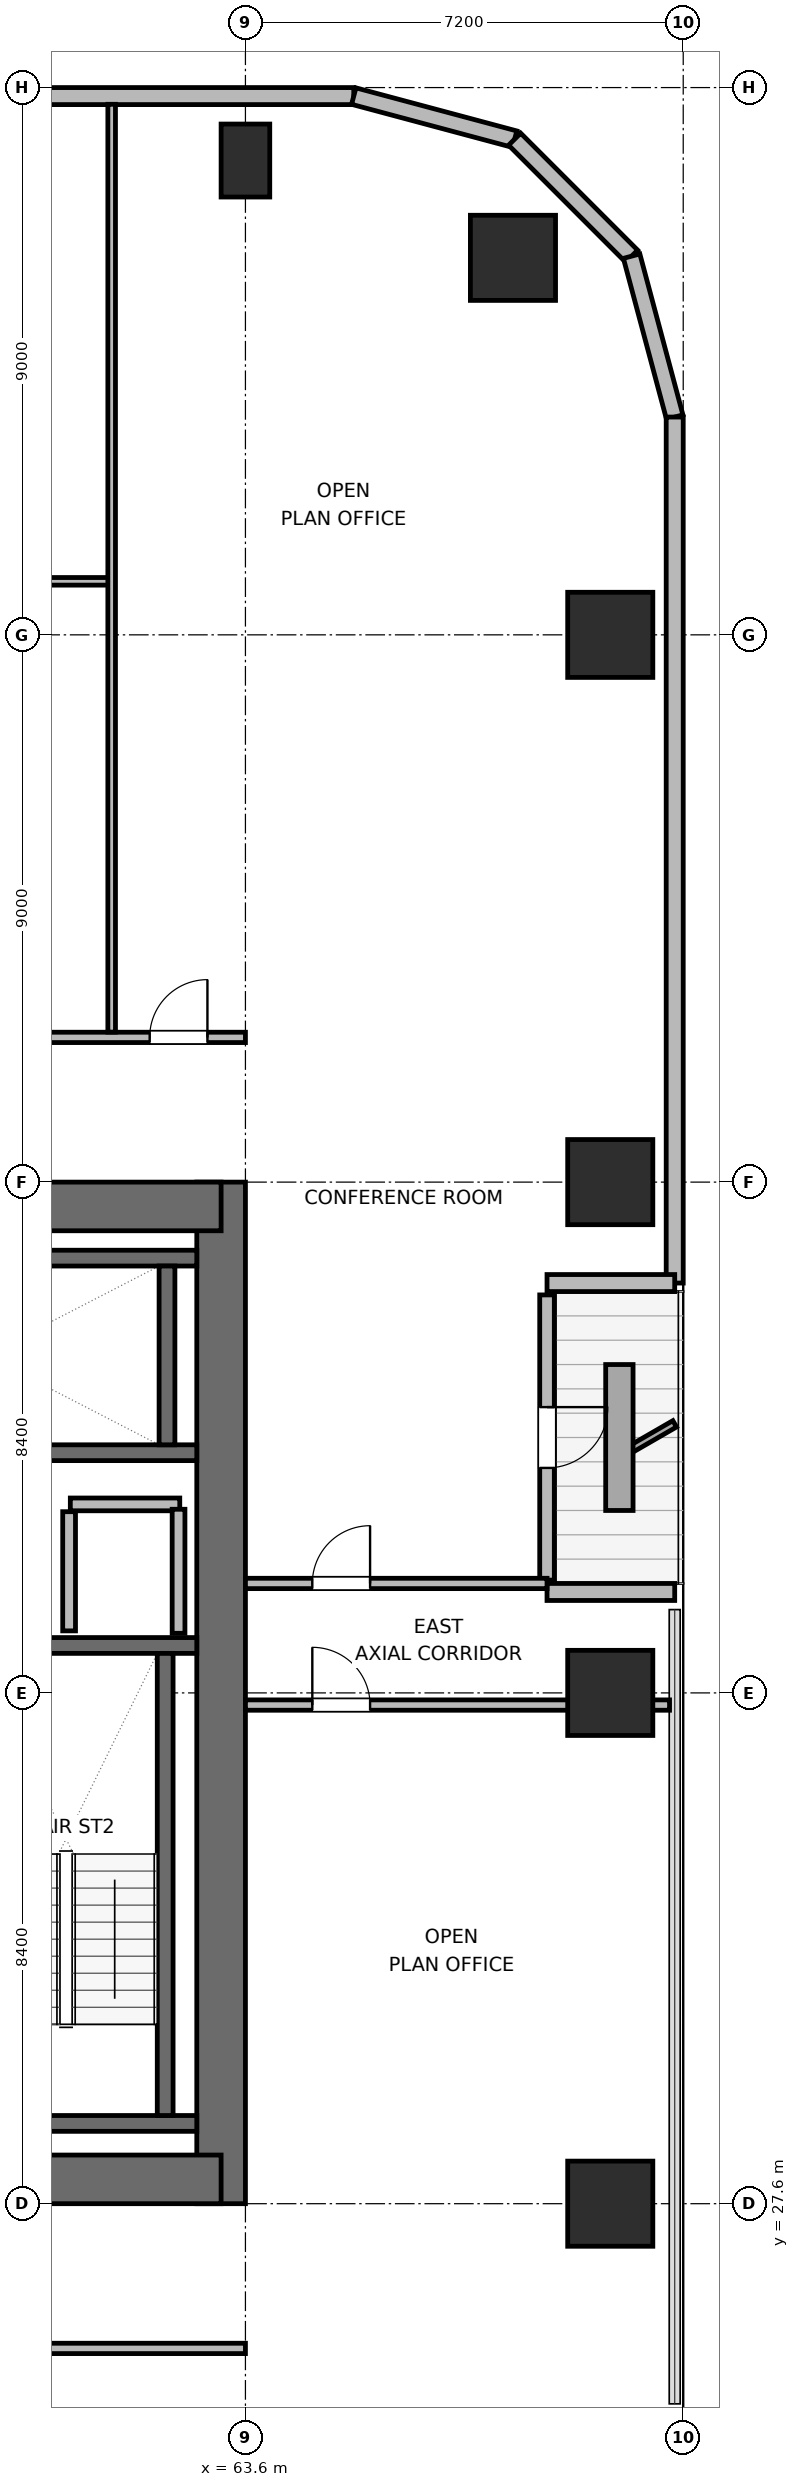
"""IFC4 building model, lengths in metres.
Left out: names, types, materials, properties, quantities, classifications, styles, units other than length and angle.
Written with IfcOpenShell. Run it as: python <this file> out.ifc"""

import sys

from ifc_helpers import new_model, si_unit, direction, frame, frame_2d, origin, origin_2d, place, context, subcontext, project, spatial, rectangle, circle, extrude, element, fill, save


model = new_model("IFC4")
c1 = context("Model", 3, precision=1e-05, world=origin(), true_north=direction((0.0, 1.0)))
c2 = subcontext(c1, "Body", "Model", "MODEL_VIEW")
j1 = project(units=[si_unit("LENGTHUNIT", "METRE"), si_unit("PLANEANGLEUNIT", "RADIAN")], contexts=[c1])
p1 = place(None, origin())
s1 = spatial("IfcSite", under=j1, at=p1, CompositionType="ELEMENT")
p2 = place(p1, origin())
s2 = spatial("IfcBuilding", under=s1, at=p2, CompositionType="ELEMENT")
p3 = place(p2, frame((0.0, 0.0, 158.4)))
s3 = spatial("IfcBuildingStorey", under=s2, at=p3, CompositionType="ELEMENT", Elevation=158.4)
p4 = place(p3, frame((63.2, 27.6, 0.0), z_axis=(0.0, 0.0, 1.0), x_axis=(0.0, 1.0, 0.0)))
e1 = element("IfcWall", 1, at=p4, inside=s3, PredefinedType="SHEAR", context=c2, shape_type="SweptSolid", body=[
    extrude(rectangle(XDim=16.8, YDim=0.8, at=frame_2d((8.4, 0.0))), origin(), (0.0, 0.0, 1.0), 3.9),
])
p5 = place(p3, frame((54.0, 28.0, 0.0), z_axis=(0.0, 0.0, 1.0), x_axis=(1.0, 0.0, 0.0)))
e2 = element("IfcWall", 2, at=p5, inside=s3, PredefinedType="SHEAR", context=c2, shape_type="SweptSolid", body=[
    extrude(rectangle(XDim=9.2, YDim=0.8, at=frame_2d((4.6, 0.0))), origin(), (0.0, 0.0, 1.0), 3.9),
])
p6 = place(p5, frame((3.975, 0.0, 0.0)))
e3 = element("IfcOpeningElement", 3, at=p6, cuts=e2, PredefinedType="OPENING", context=c2, shape_type="SweptSolid", body=[
    extrude(rectangle(XDim=1.05, YDim=2.04, at=frame_2d((0.525, 1.02))), frame((0.0, 0.41, 0.0), z_axis=(0.0, -1.0, 0.0), x_axis=(1.0, 0.0, 0.0)), (0.0, 0.0, 1.0), 0.82),
])
p7 = place(p3, frame((54.0, 44.0, 0.0), z_axis=(0.0, 0.0, 1.0), x_axis=(1.0, 0.0, 0.0)))
e4 = element("IfcWall", 4, at=p7, inside=s3, PredefinedType="SHEAR", context=c2, shape_type="SweptSolid", body=[
    extrude(rectangle(XDim=9.2, YDim=0.8, at=frame_2d((4.6, 0.0))), origin(), (0.0, 0.0, 1.0), 3.9),
])
for number, where, z_axis, x_axis in (
    (5, (58.89, 28.92, 0.0), (0.0, 0.0, 1.0), (1.0, 0.0, 0.0)),
    (6, (58.89, 36.78, 0.0), (0.0, 0.0, 1.0), (1.0, 0.0, 0.0)),
):
    element("IfcWall", number, at=place(p3, frame(where, z_axis=z_axis, x_axis=x_axis)), inside=s3, PredefinedType="SHEAR", context=c2, shape_type="SweptSolid", body=[
        extrude(rectangle(XDim=3.91, YDim=0.26, at=frame_2d((1.955, 0.0))), origin(), (0.0, 0.0, 1.0), 3.9),
    ])
p8 = place(p3, frame((62.28, 29.05, 0.0), z_axis=(0.0, 0.0, 1.0), x_axis=(0.0, 1.0, 0.0)))
e7 = element("IfcWall", 7, at=p8, inside=s3, PredefinedType="SHEAR", context=c2, shape_type="SweptSolid", body=[
    extrude(rectangle(XDim=7.6, YDim=0.26, at=frame_2d((3.8, 0.0))), origin(), (0.0, 0.0, 1.0), 3.9),
])
p9 = place(p3, frame((54.4, 39.95, 0.0), z_axis=(0.0, 0.0, 1.0), x_axis=(1.0, 0.0, 0.0)))
e8 = element("IfcWall", 8, at=p9, inside=s3, PredefinedType="SHEAR", context=c2, shape_type="SweptSolid", body=[
    extrude(rectangle(XDim=8.4, YDim=0.26, at=frame_2d((4.2, 0.0))), origin(), (0.0, 0.0, 1.0), 3.9),
])
p10 = place(p9, frame((0.8, 0.0, 0.0)))
e9 = element("IfcOpeningElement", 9, at=p10, cuts=e8, PredefinedType="OPENING", context=c2, shape_type="SweptSolid", body=[
    extrude(rectangle(XDim=1.0, YDim=2.04, at=frame_2d((0.5, 1.02))), frame((0.0, 0.14, 0.0), z_axis=(0.0, -1.0, 0.0), x_axis=(1.0, 0.0, 0.0)), (0.0, 0.0, 1.0), 0.28),
])
p11 = place(p3, frame((54.4, 43.15, 0.0), z_axis=(0.0, 0.0, 1.0), x_axis=(1.0, 0.0, 0.0)))
e10 = element("IfcWall", 10, at=p11, inside=s3, PredefinedType="SHEAR", context=c2, shape_type="SweptSolid", body=[
    extrude(rectangle(XDim=8.4, YDim=0.26, at=frame_2d((4.2, 0.0))), origin(), (0.0, 0.0, 1.0), 3.9),
])
p12 = place(p3, frame((62.31, 40.08, 0.0), z_axis=(0.0, 0.0, 1.0), x_axis=(0.0, 1.0, 0.0)))
e11 = element("IfcWall", 11, at=p12, inside=s3, PredefinedType="SHEAR", context=c2, shape_type="SweptSolid", body=[
    extrude(rectangle(XDim=2.94, YDim=0.26, at=frame_2d((1.47, 0.0))), origin(), (0.0, 0.0, 1.0), 3.9),
])
p13 = place(p3, frame((68.0, 59.6, 0.0), z_axis=(0.0, 0.0, 1.0), x_axis=(1.0, 0.0, 0.0)))
e12 = element("IfcColumn", 12, at=p13, inside=s3, PredefinedType="COLUMN", context=c2, shape_type="SweptSolid", body=[
    extrude(circle(Radius=0.7, at=origin_2d()), origin(), (0.0, 0.0, 1.0), 3.9),
])
p14 = place(p3, frame((63.6, 61.2, 0.0), z_axis=(0.0, 0.0, 1.0), x_axis=(1.0, 0.0, 0.0)))
e13 = element("IfcColumn", 13, at=p14, inside=s3, PredefinedType="COLUMN", context=c2, shape_type="SweptSolid", body=[
    extrude(rectangle(XDim=0.8, YDim=1.2, at=origin_2d()), origin(), (0.0, 0.0, 1.0), 3.9),
])
for number, where, z_axis, x_axis in (
    (14, (69.6, 27.6, 0.0), (0.0, 0.0, 1.0), (1.0, 0.0, 0.0)),
    (15, (69.6, 36.0, 0.0), (0.0, 0.0, 1.0), (1.0, 0.0, 0.0)),
    (16, (69.6, 44.4, 0.0), (0.0, 0.0, 1.0), (1.0, 0.0, 0.0)),
    (17, (69.6, 53.4, 0.0), (0.0, 0.0, 1.0), (1.0, 0.0, 0.0)),
):
    element("IfcColumn", number, at=place(p3, frame(where, z_axis=z_axis, x_axis=x_axis)), inside=s3, PredefinedType="COLUMN", context=c2, shape_type="SweptSolid", body=[
        extrude(rectangle(XDim=1.4, YDim=1.4, at=origin_2d()), origin(), (0.0, 0.0, 1.0), 3.9),
    ])
p15 = place(p3, frame((54.64, 62.26, 0.0), z_axis=(0.0, 0.0, 1.0), x_axis=(1.0, 0.0, 0.0)))
e18 = element("IfcWall", 18, at=p15, inside=s3, PredefinedType="SOLIDWALL", context=c2, shape_type="SweptSolid", body=[
    extrude(rectangle(XDim=10.742, YDim=0.28, at=frame_2d((5.371, 0.0))), origin(), (0.0, 0.0, 1.0), 3.68),
])
p16 = place(p3, frame((65.382, 62.26, 0.0), z_axis=(0.0, 0.0, 1.0), x_axis=(0.965971118627, -0.258649952598, 0.0)))
e19 = element("IfcWall", 19, at=p16, inside=s3, PredefinedType="SOLIDWALL", context=c2, shape_type="SweptSolid", body=[
    extrude(rectangle(XDim=2.739, YDim=0.28, at=frame_2d((1.37, 0.0))), origin(), (0.0, 0.0, 1.0), 3.68),
])
p17 = place(p3, frame((68.028, 61.552, 0.0), z_axis=(0.0, 0.0, 1.0), x_axis=(0.707061915429, -0.707151644098, 0.0)))
e20 = element("IfcWall", 20, at=p17, inside=s3, PredefinedType="SOLIDWALL", context=c2, shape_type="SweptSolid", body=[
    extrude(rectangle(XDim=2.721, YDim=0.28, at=frame_2d((1.36, 0.0))), origin(), (0.0, 0.0, 1.0), 3.68),
])
p18 = place(p3, frame((69.951, 59.627, 0.0), z_axis=(0.0, 0.0, 1.0), x_axis=(0.258672222976, -0.9659651552, 0.0)))
e21 = element("IfcWall", 21, at=p18, inside=s3, PredefinedType="SOLIDWALL", context=c2, shape_type="SweptSolid", body=[
    extrude(rectangle(XDim=2.739, YDim=0.28, at=frame_2d((1.37, 0.0))), origin(), (0.0, 0.0, 1.0), 3.68),
])
p19 = place(p3, frame((70.66, 56.982, 0.0), z_axis=(0.0, 0.0, 1.0), x_axis=(0.0, -1.0, 0.0)))
e22 = element("IfcWall", 22, at=p19, inside=s3, PredefinedType="SOLIDWALL", context=c2, shape_type="SweptSolid", body=[
    extrude(rectangle(XDim=14.242, YDim=0.28, at=frame_2d((7.121, 0.0))), origin(), (0.0, 0.0, 1.0), 3.68),
])
p20 = place(p3, frame((70.66, 42.74, 0.0), z_axis=(0.0, 0.0, 1.0), x_axis=(-1.0, 0.0, 0.0)))
e23 = element("IfcWall", 23, at=p20, inside=s3, PredefinedType="SOLIDWALL", context=c2, shape_type="SweptSolid", body=[
    extrude(rectangle(XDim=2.1, YDim=0.28, at=frame_2d((1.05, 0.0))), origin(), (0.0, 0.0, 1.0), 3.116),
])
p21 = place(p3, frame((68.56, 42.545, 0.0), z_axis=(0.0, 0.0, 1.0), x_axis=(0.0, -1.0, 0.0)))
e24 = element("IfcWall", 24, at=p21, inside=s3, PredefinedType="SOLIDWALL", context=c2, shape_type="SweptSolid", body=[
    extrude(rectangle(XDim=4.69, YDim=0.24, at=frame_2d((2.345, 0.0))), origin(), (0.0, 0.0, 1.0), 3.248),
])
p22 = place(p21, frame((1.845, 0.0, 0.0)))
e25 = element("IfcOpeningElement", 25, at=p22, cuts=e24, PredefinedType="OPENING", context=c2, shape_type="SweptSolid", body=[
    extrude(rectangle(XDim=1.0, YDim=2.02, at=frame_2d((0.5, 1.01))), frame((0.0, 0.13, 0.0), z_axis=(0.0, -1.0, 0.0), x_axis=(1.0, 0.0, 0.0)), (0.0, 0.0, 1.0), 0.26),
])
p23 = place(p3, frame((68.56, 37.66, 0.0), z_axis=(0.0, 0.0, 1.0), x_axis=(1.0, 0.0, 0.0)))
e26 = element("IfcWall", 26, at=p23, inside=s3, PredefinedType="SOLIDWALL", context=c2, shape_type="SweptSolid", body=[
    extrude(rectangle(XDim=2.1, YDim=0.28, at=frame_2d((1.05, 0.0))), origin(), (0.0, 0.0, 1.0), 3.116),
])
p24 = place(p3, frame((60.72, 39.1, 0.0), z_axis=(0.0, 0.0, 1.0), x_axis=(1.0, 0.0, 0.0)))
e27 = element("IfcWall", 27, at=p24, inside=s3, PredefinedType="PARTITIONING", context=c2, shape_type="SweptSolid", body=[
    extrude(rectangle(XDim=1.8, YDim=0.21, at=frame_2d((0.9, 0.0))), origin(), (0.0, 0.0, 1.0), 3.68),
])
p25 = place(p3, frame((60.7, 37.02, 0.0), z_axis=(0.0, 0.0, 1.0), x_axis=(0.0, 1.0, 0.0)))
e28 = element("IfcWall", 28, at=p25, inside=s3, PredefinedType="PARTITIONING", context=c2, shape_type="SweptSolid", body=[
    extrude(rectangle(XDim=1.96, YDim=0.21, at=frame_2d((0.98, 0.0))), origin(), (0.0, 0.0, 1.0), 3.68),
])
p26 = place(p3, frame((62.5, 36.98, 0.0), z_axis=(0.0, 0.0, 1.0), x_axis=(0.0, 1.0, 0.0)))
e29 = element("IfcWall", 29, at=p26, inside=s3, PredefinedType="PARTITIONING", context=c2, shape_type="SweptSolid", body=[
    extrude(rectangle(XDim=2.04, YDim=0.21, at=frame_2d((1.02, 0.0))), origin(), (0.0, 0.0, 1.0), 3.68),
])
p27 = place(p3, frame((30.075, 25.22, 0.0), z_axis=(0.0, 0.0, 1.0), x_axis=(1.0, 0.0, 0.0)))
e30 = element("IfcWall", 30, at=p27, inside=s3, PredefinedType="PARTITIONING", context=c2, shape_type="SweptSolid", body=[
    extrude(rectangle(XDim=33.525, YDim=0.17, at=frame_2d((16.763, 0.0))), origin(), (0.0, 0.0, 1.0), 3.68),
])
p28 = place(p27, frame((3.238, 0.0, 0.0)))
e31 = element("IfcOpeningElement", 31, at=p28, cuts=e30, PredefinedType="OPENING", context=c2, shape_type="SweptSolid", body=[
    extrude(rectangle(XDim=0.95, YDim=2.04, at=frame_2d((0.475, 1.02))), frame((0.0, 0.095, 0.0), z_axis=(0.0, -1.0, 0.0), x_axis=(1.0, 0.0, 0.0)), (0.0, 0.0, 1.0), 0.19),
])
p29 = place(p27, frame((10.065, 0.0, 0.0)))
e32 = element("IfcOpeningElement", 32, at=p29, cuts=e30, PredefinedType="OPENING", context=c2, shape_type="SweptSolid", body=[
    extrude(rectangle(XDim=0.95, YDim=2.04, at=frame_2d((0.475, 1.02))), frame((0.0, 0.095, 0.0), z_axis=(0.0, -1.0, 0.0), x_axis=(1.0, 0.0, 0.0)), (0.0, 0.0, 1.0), 0.19),
])
p30 = place(p27, frame((16.29, 0.0, 0.0)))
e33 = element("IfcOpeningElement", 33, at=p30, cuts=e30, PredefinedType="OPENING", context=c2, shape_type="SweptSolid", body=[
    extrude(rectangle(XDim=0.95, YDim=2.04, at=frame_2d((0.475, 1.02))), frame((0.0, 0.095, 0.0), z_axis=(0.0, -1.0, 0.0), x_axis=(1.0, 0.0, 0.0)), (0.0, 0.0, 1.0), 0.19),
])
p31 = place(p27, frame((22.51, 0.0, 0.0)))
e34 = element("IfcOpeningElement", 34, at=p31, cuts=e30, PredefinedType="OPENING", context=c2, shape_type="SweptSolid", body=[
    extrude(rectangle(XDim=0.95, YDim=2.04, at=frame_2d((0.475, 1.02))), frame((0.0, 0.095, 0.0), z_axis=(0.0, -1.0, 0.0), x_axis=(1.0, 0.0, 0.0)), (0.0, 0.0, 1.0), 0.19),
])
p32 = place(p27, frame((29.335, 0.0, 0.0)))
e35 = element("IfcOpeningElement", 35, at=p32, cuts=e30, PredefinedType="OPENING", context=c2, shape_type="SweptSolid", body=[
    extrude(rectangle(XDim=0.95, YDim=2.04, at=frame_2d((0.475, 1.02))), frame((0.0, 0.095, 0.0), z_axis=(0.0, -1.0, 0.0), x_axis=(1.0, 0.0, 0.0)), (0.0, 0.0, 1.0), 0.19),
])
p33 = place(p3, frame((30.075, 46.78, 0.0), z_axis=(0.0, 0.0, 1.0), x_axis=(1.0, 0.0, 0.0)))
e36 = element("IfcWall", 36, at=p33, inside=s3, PredefinedType="PARTITIONING", context=c2, shape_type="SweptSolid", body=[
    extrude(rectangle(XDim=33.525, YDim=0.17, at=frame_2d((16.763, 0.0))), origin(), (0.0, 0.0, 1.0), 3.68),
])
p34 = place(p33, frame((4.543, 0.0, 0.0)))
e37 = element("IfcOpeningElement", 37, at=p34, cuts=e36, PredefinedType="OPENING", context=c2, shape_type="SweptSolid", body=[
    extrude(rectangle(XDim=0.95, YDim=2.04, at=frame_2d((0.475, 1.02))), frame((0.0, 0.095, 0.0), z_axis=(0.0, -1.0, 0.0), x_axis=(1.0, 0.0, 0.0)), (0.0, 0.0, 1.0), 0.19),
])
p35 = place(p33, frame((11.37, 0.0, 0.0)))
e38 = element("IfcOpeningElement", 38, at=p35, cuts=e36, PredefinedType="OPENING", context=c2, shape_type="SweptSolid", body=[
    extrude(rectangle(XDim=0.95, YDim=2.04, at=frame_2d((0.475, 1.02))), frame((0.0, 0.095, 0.0), z_axis=(0.0, -1.0, 0.0), x_axis=(1.0, 0.0, 0.0)), (0.0, 0.0, 1.0), 0.19),
])
p36 = place(p33, frame((18.905, 0.0, 0.0)))
e39 = element("IfcOpeningElement", 39, at=p36, cuts=e36, PredefinedType="OPENING", context=c2, shape_type="SweptSolid", body=[
    extrude(rectangle(XDim=0.95, YDim=2.04, at=frame_2d((0.475, 1.02))), frame((0.0, 0.095, 0.0), z_axis=(0.0, -1.0, 0.0), x_axis=(1.0, 0.0, 0.0)), (0.0, 0.0, 1.0), 0.19),
])
p37 = place(p33, frame((27.74, 0.0, 0.0)))
e40 = element("IfcOpeningElement", 40, at=p37, cuts=e36, PredefinedType="OPENING", context=c2, shape_type="SweptSolid", body=[
    extrude(rectangle(XDim=0.95, YDim=2.04, at=frame_2d((0.475, 1.02))), frame((0.0, 0.095, 0.0), z_axis=(0.0, -1.0, 0.0), x_axis=(1.0, 0.0, 0.0)), (0.0, 0.0, 1.0), 0.19),
])
p38 = place(p33, frame((31.95, 0.0, 0.0)))
e41 = element("IfcOpeningElement", 41, at=p38, cuts=e36, PredefinedType="OPENING", context=c2, shape_type="SweptSolid", body=[
    extrude(rectangle(XDim=0.95, YDim=2.04, at=frame_2d((0.475, 1.02))), frame((0.0, 0.095, 0.0), z_axis=(0.0, -1.0, 0.0), x_axis=(1.0, 0.0, 0.0)), (0.0, 0.0, 1.0), 0.19),
])
p39 = place(p3, frame((55.18, 54.28, 0.0), z_axis=(0.0, 0.0, 1.0), x_axis=(1.0, 0.0, 0.0)))
e42 = element("IfcWall", 42, at=p39, inside=s3, PredefinedType="PARTITIONING", context=c2, shape_type="SweptSolid", body=[
    extrude(rectangle(XDim=6.22, YDim=0.125, at=frame_2d((3.11, 0.0))), origin(), (0.0, 0.0, 1.0), 3.68),
])
p40 = place(p39, frame((2.66, 0.0, 0.0)))
e43 = element("IfcOpeningElement", 43, at=p40, cuts=e42, PredefinedType="OPENING", context=c2, shape_type="SweptSolid", body=[
    extrude(rectangle(XDim=0.9, YDim=2.02, at=frame_2d((0.45, 1.01))), frame((0.0, 0.073, 0.0), z_axis=(0.0, -1.0, 0.0), x_axis=(1.0, 0.0, 0.0)), (0.0, 0.0, 1.0), 0.145),
])
p41 = place(p3, frame((61.4, 46.867, 0.0), z_axis=(0.0, 0.0, 1.0), x_axis=(0.0, 1.0, 0.0)))
e44 = element("IfcWall", 44, at=p41, inside=s3, PredefinedType="PARTITIONING", context=c2, shape_type="SweptSolid", body=[
    extrude(rectangle(XDim=15.258, YDim=0.125, at=frame_2d((7.629, 0.0))), origin(), (0.0, 0.0, 1.0), 3.68),
])
p42 = place(p3, frame((63.6, 35.8, 0.0), z_axis=(0.0, 0.0, 1.0), x_axis=(1.0, 0.0, 0.0)))
e45 = element("IfcWall", 45, at=p42, inside=s3, PredefinedType="PARTITIONING", context=c2, shape_type="SweptSolid", body=[
    extrude(rectangle(XDim=6.975, YDim=0.17, at=frame_2d((3.487, 0.0))), origin(), (0.0, 0.0, 1.0), 3.043),
])
p43 = place(p42, frame((1.1, 0.0, 0.0)))
e46 = element("IfcOpeningElement", 46, at=p43, cuts=e45, PredefinedType="OPENING", context=c2, shape_type="SweptSolid", body=[
    extrude(rectangle(XDim=0.95, YDim=2.04, at=frame_2d((0.475, 1.02))), frame((0.0, 0.095, 0.0), z_axis=(0.0, -1.0, 0.0), x_axis=(1.0, 0.0, 0.0)), (0.0, 0.0, 1.0), 0.19),
])
p44 = place(p3, frame((63.6, 37.8, 0.0), z_axis=(0.0, 0.0, 1.0), x_axis=(1.0, 0.0, 0.0)))
e47 = element("IfcWall", 47, at=p44, inside=s3, PredefinedType="PARTITIONING", context=c2, shape_type="SweptSolid", body=[
    extrude(rectangle(XDim=4.96, YDim=0.17, at=frame_2d((2.48, 0.0))), origin(), (0.0, 0.0, 1.0), 3.68),
])
p45 = place(p44, frame((1.1, 0.0, 0.0)))
e48 = element("IfcOpeningElement", 48, at=p45, cuts=e47, PredefinedType="OPENING", context=c2, shape_type="SweptSolid", body=[
    extrude(rectangle(XDim=0.95, YDim=2.04, at=frame_2d((0.475, 1.02))), frame((0.0, 0.095, 0.0), z_axis=(0.0, -1.0, 0.0), x_axis=(1.0, 0.0, 0.0)), (0.0, 0.0, 1.0), 0.19),
])
p46 = place(p22, origin())
e49 = element("IfcDoor", 49, at=p46, inside=s3, OperationType="SINGLE_SWING_LEFT", PredefinedType="DOOR", context=c2, shape_type="SweptSolid", body=[
    extrude(rectangle(XDim=1.0, YDim=2.02, at=frame_2d((0.5, 1.01))), frame((0.0, 0.025, 0.0), z_axis=(0.0, -1.0, 0.0), x_axis=(1.0, 0.0, 0.0)), (0.0, 0.0, 1.0), 0.05),
])
fill(e25, e49)
p47 = place(p38, origin())
e50 = element("IfcDoor", 50, at=p47, inside=s3, OperationType="SINGLE_SWING_RIGHT", PredefinedType="DOOR", context=c2, shape_type="SweptSolid", body=[
    extrude(rectangle(XDim=0.95, YDim=2.04, at=frame_2d((0.475, 1.02))), frame((0.0, 0.025, 0.0), z_axis=(0.0, -1.0, 0.0), x_axis=(1.0, 0.0, 0.0)), (0.0, 0.0, 1.0), 0.05),
])
fill(e41, e50)
p48 = place(p43, origin())
e51 = element("IfcDoor", 51, at=p48, inside=s3, OperationType="SINGLE_SWING_LEFT", PredefinedType="DOOR", context=c2, shape_type="SweptSolid", body=[
    extrude(rectangle(XDim=0.95, YDim=2.04, at=frame_2d((0.475, 1.02))), frame((0.0, 0.025, 0.0), z_axis=(0.0, -1.0, 0.0), x_axis=(1.0, 0.0, 0.0)), (0.0, 0.0, 1.0), 0.05),
])
fill(e46, e51)
p49 = place(p45, origin())
e52 = element("IfcDoor", 52, at=p49, inside=s3, OperationType="SINGLE_SWING_RIGHT", PredefinedType="DOOR", context=c2, shape_type="SweptSolid", body=[
    extrude(rectangle(XDim=0.95, YDim=2.04, at=frame_2d((0.475, 1.02))), frame((0.0, 0.025, 0.0), z_axis=(0.0, -1.0, 0.0), x_axis=(1.0, 0.0, 0.0)), (0.0, 0.0, 1.0), 0.05),
])
fill(e48, e52)
save(model, sys.argv[1])
